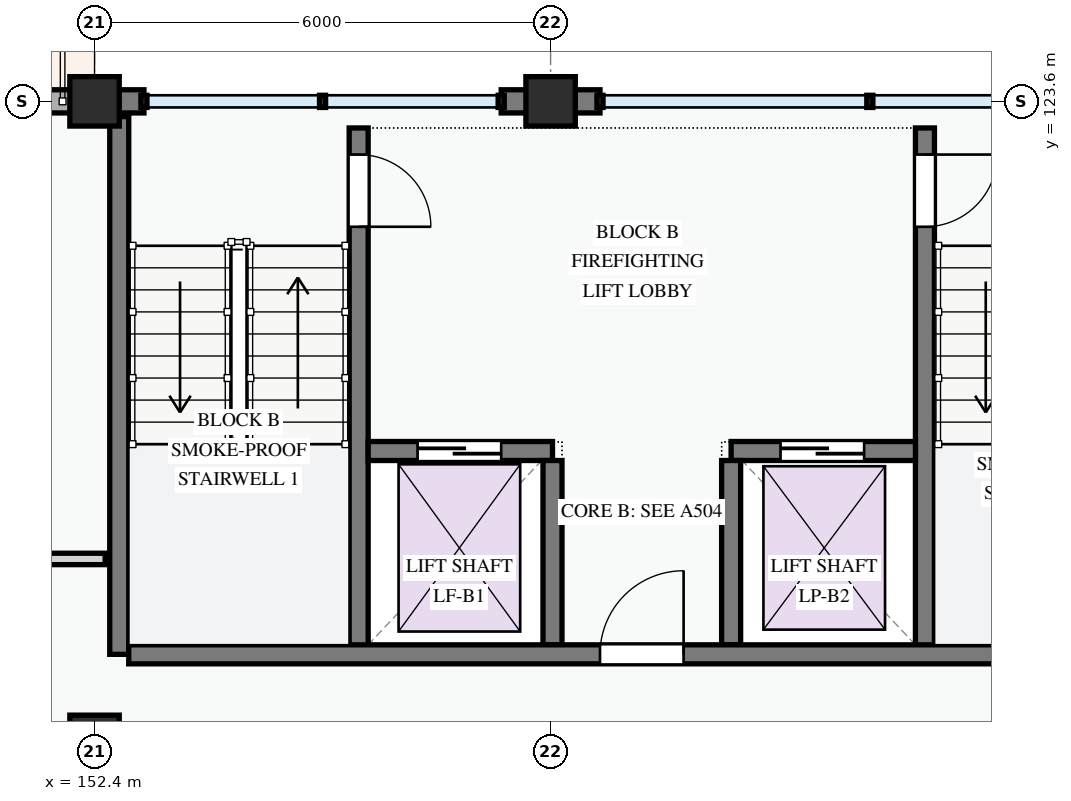
"""IFC4 building model, lengths in metres.
Left out: names, types, materials, properties, quantities, classifications, styles, units other than length and angle.
Written with IfcOpenShell. Run it as: python <this file> out.ifc"""

import sys

from ifc_helpers import new_model, si_unit, direction, frame, frame_2d, origin, origin_2d, place, context, subcontext, project, spatial, rectangle, extrude, element, fill, save


model = new_model("IFC4")
c1 = context("Model", 3, precision=1e-05, world=origin(), true_north=direction((0.0, 1.0)))
c2 = subcontext(c1, "Body", "Model", "MODEL_VIEW")
j1 = project(units=[si_unit("LENGTHUNIT", "METRE"), si_unit("PLANEANGLEUNIT", "RADIAN")], contexts=[c1])
p1 = place(None, origin())
s1 = spatial("IfcSite", under=j1, at=p1, CompositionType="ELEMENT")
p2 = place(p1, origin())
s2 = spatial("IfcBuilding", under=s1, at=p2, CompositionType="ELEMENT")
p3 = place(p2, frame((0.0, 0.0, 21.3)))
s3 = spatial("IfcBuildingStorey", under=s2, at=p3, CompositionType="ELEMENT", Elevation=21.3)
for number, where, z_axis, x_axis in (
    (1, (152.4, 115.2, 0.0), (0.0, 0.0, 1.0), (1.0, 0.0, 0.0)),
    (2, (152.4, 123.6, 0.0), (0.0, 0.0, 1.0), (1.0, 0.0, 0.0)),
    (3, (158.4, 123.6, 0.0), (0.0, 0.0, 1.0), (1.0, 0.0, 0.0)),
):
    element("IfcColumn", number, at=place(p3, frame(where, z_axis=z_axis, x_axis=x_axis)), inside=s3, PredefinedType="COLUMN", context=c2, shape_type="SweptSolid", body=[
        extrude(rectangle(XDim=0.65, YDim=0.65, at=origin_2d()), origin(), (0.0, 0.0, 1.0), 3.3),
    ])
p4 = place(p3, frame((159.05, 123.6, 0.0), z_axis=(0.0, 0.0, 1.0), x_axis=(-1.0, 0.0, 0.0)))
e4 = element("IfcWall", 4, at=p4, inside=s3, PredefinedType="STANDARD", context=c2, shape_type="SweptSolid", body=[
    extrude(rectangle(XDim=0.65, YDim=0.305, at=frame_2d((0.325, 0.0))), origin(), (0.0, 0.0, 1.0), 3.04),
])
p5 = place(p3, frame((158.4, 123.6, 0.0), z_axis=(0.0, 0.0, 1.0), x_axis=(-1.0, 0.0, 0.0)))
e5 = element("IfcWall", 5, at=p5, inside=s3, PredefinedType="STANDARD", context=c2, shape_type="SweptSolid", body=[
    extrude(rectangle(XDim=0.65, YDim=0.305, at=frame_2d((0.325, 0.0))), origin(), (0.0, 0.0, 1.0), 3.04),
])
p6 = place(p3, frame((153.05, 123.6, 0.0), z_axis=(0.0, 0.0, 1.0), x_axis=(-1.0, 0.0, 0.0)))
e6 = element("IfcWall", 6, at=p6, inside=s3, PredefinedType="STANDARD", context=c2, shape_type="SweptSolid", body=[
    extrude(rectangle(XDim=0.65, YDim=0.305, at=frame_2d((0.325, 0.0))), origin(), (0.0, 0.0, 1.0), 3.04),
])
p7 = place(p3, frame((152.4, 123.6, 0.0), z_axis=(0.0, 0.0, 1.0), x_axis=(-1.0, 0.0, 0.0)))
e7 = element("IfcWall", 7, at=p7, inside=s3, PredefinedType="STANDARD", context=c2, shape_type="SweptSolid", body=[
    extrude(rectangle(XDim=8.4, YDim=0.305, at=frame_2d((4.2, 0.0))), origin(), (0.0, 0.0, 1.0), 2.345),
])
p8 = place(p7, frame((0.62, 0.0, 0.0)))
e8 = element("IfcOpeningElement", 8, at=p8, cuts=e7, PredefinedType="OPENING", context=c2, shape_type="SweptSolid", body=[
    extrude(rectangle(XDim=1.1, YDim=2.15, at=frame_2d((0.55, 1.075))), frame((0.0, 0.163, 0.0), z_axis=(0.0, -1.0, 0.0), x_axis=(1.0, 0.0, 0.0)), (0.0, 0.0, 1.0), 0.325),
])
p9 = place(p7, frame((2.89, 0.0, 0.78)))
e9 = element("IfcOpeningElement", 9, at=p9, cuts=e7, PredefinedType="OPENING", context=c2, shape_type="SweptSolid", body=[
    extrude(rectangle(XDim=1.05, YDim=1.2, at=frame_2d((0.525, 0.6))), frame((0.0, 0.163, 0.0), z_axis=(0.0, -1.0, 0.0), x_axis=(1.0, 0.0, 0.0)), (0.0, 0.0, 1.0), 0.325),
])
p10 = place(p7, frame((5.755, 0.0, 0.78)))
e10 = element("IfcOpeningElement", 10, at=p10, cuts=e7, PredefinedType="OPENING", context=c2, shape_type="SweptSolid", body=[
    extrude(rectangle(XDim=1.62, YDim=1.38, at=frame_2d((0.81, 0.69))), frame((0.0, 0.163, 0.0), z_axis=(0.0, -1.0, 0.0), x_axis=(1.0, 0.0, 0.0)), (0.0, 0.0, 1.0), 0.325),
])
p11 = place(p3, frame((155.875, 123.25, 0.0), z_axis=(0.0, 0.0, 1.0), x_axis=(0.0, -1.0, 0.0)))
e11 = element("IfcWall", 11, at=p11, inside=s3, PredefinedType="SHEAR", context=c2, shape_type="SweptSolid", body=[
    extrude(rectangle(XDim=6.925, YDim=0.25, at=frame_2d((3.462, 0.0))), origin(), (0.0, 0.0, 1.0), 3.0),
])
p12 = place(p11, frame((0.35, 0.0, 0.0)))
e12 = element("IfcOpeningElement", 12, at=p12, cuts=e11, PredefinedType="OPENING", context=c2, shape_type="SweptSolid", body=[
    extrude(rectangle(XDim=0.95, YDim=2.1, at=frame_2d((0.475, 1.05))), frame((0.0, 0.135, 0.0), z_axis=(0.0, -1.0, 0.0), x_axis=(1.0, 0.0, 0.0)), (0.0, 0.0, 1.0), 0.27),
])
p13 = place(p3, frame((152.725, 123.4, 0.0), z_axis=(0.0, 0.0, 1.0), x_axis=(0.0, -1.0, 0.0)))
e13 = element("IfcWall", 13, at=p13, inside=s3, PredefinedType="SHEAR", context=c2, shape_type="SweptSolid", body=[
    extrude(rectangle(XDim=7.075, YDim=0.25, at=frame_2d((3.538, 0.0))), origin(), (0.0, 0.0, 1.0), 3.0),
])
p14 = place(p3, frame((163.325, 123.25, 0.0), z_axis=(0.0, 0.0, 1.0), x_axis=(0.0, -1.0, 0.0)))
e14 = element("IfcWall", 14, at=p14, inside=s3, PredefinedType="SHEAR", context=c2, shape_type="SweptSolid", body=[
    extrude(rectangle(XDim=6.925, YDim=0.25, at=frame_2d((3.462, 0.0))), origin(), (0.0, 0.0, 1.0), 3.0),
])
p15 = place(p14, frame((0.35, 0.0, 0.0)))
e15 = element("IfcOpeningElement", 15, at=p15, cuts=e14, PredefinedType="OPENING", context=c2, shape_type="SweptSolid", body=[
    extrude(rectangle(XDim=0.95, YDim=2.1, at=frame_2d((0.475, 1.05))), frame((0.0, 0.135, 0.0), z_axis=(0.0, -1.0, 0.0), x_axis=(1.0, 0.0, 0.0)), (0.0, 0.0, 1.0), 0.27),
])
p16 = place(p3, frame((156.0, 119.0, 0.0), z_axis=(0.0, 0.0, 1.0), x_axis=(1.0, 0.0, 0.0)))
e16 = element("IfcWall", 16, at=p16, inside=s3, PredefinedType="SHEAR", context=c2, shape_type="SweptSolid", body=[
    extrude(rectangle(XDim=2.425, YDim=0.25, at=frame_2d((1.212, 0.0))), origin(), (0.0, 0.0, 1.0), 3.0),
])
p17 = place(p16, frame((0.65, 0.0, 0.0)))
e17 = element("IfcOpeningElement", 17, at=p17, cuts=e16, PredefinedType="OPENING", context=c2, shape_type="SweptSolid", body=[
    extrude(rectangle(XDim=1.1, YDim=2.15, at=frame_2d((0.55, 1.075))), frame((0.0, 0.135, 0.0), z_axis=(0.0, -1.0, 0.0), x_axis=(1.0, 0.0, 0.0)), (0.0, 0.0, 1.0), 0.27),
])
p18 = place(p3, frame((160.775, 119.0, 0.0), z_axis=(0.0, 0.0, 1.0), x_axis=(1.0, 0.0, 0.0)))
e18 = element("IfcWall", 18, at=p18, inside=s3, PredefinedType="SHEAR", context=c2, shape_type="SweptSolid", body=[
    extrude(rectangle(XDim=2.425, YDim=0.25, at=frame_2d((1.212, 0.0))), origin(), (0.0, 0.0, 1.0), 3.0),
])
p19 = place(p18, frame((0.65, 0.0, 0.0)))
e19 = element("IfcOpeningElement", 19, at=p19, cuts=e18, PredefinedType="OPENING", context=c2, shape_type="SweptSolid", body=[
    extrude(rectangle(XDim=1.1, YDim=2.15, at=frame_2d((0.55, 1.075))), frame((0.0, 0.135, 0.0), z_axis=(0.0, -1.0, 0.0), x_axis=(1.0, 0.0, 0.0)), (0.0, 0.0, 1.0), 0.27),
])
for number, where, z_axis, x_axis in (
    (20, (158.425, 118.875, 0.0), (0.0, 0.0, 1.0), (0.0, -1.0, 0.0)),
    (21, (160.775, 118.875, 0.0), (0.0, 0.0, 1.0), (0.0, -1.0, 0.0)),
):
    element("IfcWall", number, at=place(p3, frame(where, z_axis=z_axis, x_axis=x_axis)), inside=s3, PredefinedType="SHEAR", context=c2, shape_type="SweptSolid", body=[
        extrude(rectangle(XDim=2.425, YDim=0.25, at=frame_2d((1.212, 0.0))), origin(), (0.0, 0.0, 1.0), 3.0),
    ])
p20 = place(p3, frame((152.85, 116.325, 0.0), z_axis=(0.0, 0.0, 1.0), x_axis=(1.0, 0.0, 0.0)))
e22 = element("IfcWall", 22, at=p20, inside=s3, PredefinedType="SHEAR", context=c2, shape_type="SweptSolid", body=[
    extrude(rectangle(XDim=13.5, YDim=0.25, at=frame_2d((6.75, 0.0))), origin(), (0.0, 0.0, 1.0), 3.0),
])
p21 = place(p20, frame((6.2, 0.0, 0.0)))
e23 = element("IfcOpeningElement", 23, at=p21, cuts=e22, PredefinedType="OPENING", context=c2, shape_type="SweptSolid", body=[
    extrude(rectangle(XDim=1.1, YDim=2.15, at=frame_2d((0.55, 1.075))), frame((0.0, 0.135, 0.0), z_axis=(0.0, -1.0, 0.0), x_axis=(1.0, 0.0, 0.0)), (0.0, 0.0, 1.0), 0.27),
])
p22 = place(p3, frame((80.554, 117.58, 0.0), z_axis=(0.0, 0.0, 1.0), x_axis=(1.0, 0.0, 0.0)))
e24 = element("IfcWall", 24, at=p22, inside=s3, PredefinedType="PARTITIONING", context=c2, shape_type="SweptSolid", body=[
    extrude(rectangle(XDim=71.986, YDim=0.15, at=frame_2d((35.993, 0.0))), origin(), (0.0, 0.0, 1.0), 3.0),
])
p23 = place(p22, frame((2.254, 0.0, 0.0)))
e25 = element("IfcOpeningElement", 25, at=p23, cuts=e24, PredefinedType="OPENING", context=c2, shape_type="SweptSolid", body=[
    extrude(rectangle(XDim=0.92, YDim=2.1, at=frame_2d((0.46, 1.05))), frame((0.0, 0.085, 0.0), z_axis=(0.0, -1.0, 0.0), x_axis=(1.0, 0.0, 0.0)), (0.0, 0.0, 1.0), 0.17),
])
p24 = place(p22, frame((23.937, 0.0, 0.0)))
e26 = element("IfcOpeningElement", 26, at=p24, cuts=e24, PredefinedType="OPENING", context=c2, shape_type="SweptSolid", body=[
    extrude(rectangle(XDim=0.96, YDim=2.12, at=frame_2d((0.48, 1.06))), frame((0.0, 0.085, 0.0), z_axis=(0.0, -1.0, 0.0), x_axis=(1.0, 0.0, 0.0)), (0.0, 0.0, 1.0), 0.17),
])
p25 = place(p22, frame((39.125, 0.0, 0.0)))
e27 = element("IfcOpeningElement", 27, at=p25, cuts=e24, PredefinedType="OPENING", context=c2, shape_type="SweptSolid", body=[
    extrude(rectangle(XDim=0.92, YDim=2.1, at=frame_2d((0.46, 1.05))), frame((0.0, 0.085, 0.0), z_axis=(0.0, -1.0, 0.0), x_axis=(1.0, 0.0, 0.0)), (0.0, 0.0, 1.0), 0.17),
])
p26 = place(p22, frame((59.922, 0.0, 0.0)))
e28 = element("IfcOpeningElement", 28, at=p26, cuts=e24, PredefinedType="OPENING", context=c2, shape_type="SweptSolid", body=[
    extrude(rectangle(XDim=0.92, YDim=2.1, at=frame_2d((0.46, 1.05))), frame((0.0, 0.085, 0.0), z_axis=(0.0, -1.0, 0.0), x_axis=(1.0, 0.0, 0.0)), (0.0, 0.0, 1.0), 0.17),
])
p27 = place(p12, origin())
e29 = element("IfcDoor", 29, at=p27, inside=s3, OperationType="SINGLE_SWING_RIGHT", PredefinedType="DOOR", context=c2, shape_type="SweptSolid", body=[
    extrude(rectangle(XDim=0.95, YDim=2.1, at=frame_2d((0.475, 1.05))), frame((0.0, 0.025, 0.0), z_axis=(0.0, -1.0, 0.0), x_axis=(1.0, 0.0, 0.0)), (0.0, 0.0, 1.0), 0.05),
])
fill(e12, e29)
p28 = place(p15, origin())
e30 = element("IfcDoor", 30, at=p28, inside=s3, OperationType="SINGLE_SWING_LEFT", PredefinedType="DOOR", context=c2, shape_type="SweptSolid", body=[
    extrude(rectangle(XDim=0.95, YDim=2.1, at=frame_2d((0.475, 1.05))), frame((0.0, 0.025, 0.0), z_axis=(0.0, -1.0, 0.0), x_axis=(1.0, 0.0, 0.0)), (0.0, 0.0, 1.0), 0.05),
])
fill(e15, e30)
p29 = place(p17, origin())
e31 = element("IfcDoor", 31, at=p29, inside=s3, OperationType="SLIDING_TO_LEFT", PredefinedType="DOOR", context=c2, shape_type="SweptSolid", body=[
    extrude(rectangle(XDim=1.1, YDim=2.15, at=frame_2d((0.55, 1.075))), frame((0.0, 0.025, 0.0), z_axis=(0.0, -1.0, 0.0), x_axis=(1.0, 0.0, 0.0)), (0.0, 0.0, 1.0), 0.05),
])
fill(e17, e31)
p30 = place(p19, origin())
e32 = element("IfcDoor", 32, at=p30, inside=s3, OperationType="SLIDING_TO_LEFT", PredefinedType="DOOR", context=c2, shape_type="SweptSolid", body=[
    extrude(rectangle(XDim=1.1, YDim=2.15, at=frame_2d((0.55, 1.075))), frame((0.0, 0.025, 0.0), z_axis=(0.0, -1.0, 0.0), x_axis=(1.0, 0.0, 0.0)), (0.0, 0.0, 1.0), 0.05),
])
fill(e19, e32)
p31 = place(p21, origin())
e33 = element("IfcDoor", 33, at=p31, inside=s3, OperationType="SINGLE_SWING_RIGHT", PredefinedType="DOOR", context=c2, shape_type="SweptSolid", body=[
    extrude(rectangle(XDim=1.1, YDim=2.15, at=frame_2d((0.55, 1.075))), frame((0.0, 0.025, 0.0), z_axis=(0.0, -1.0, 0.0), x_axis=(1.0, 0.0, 0.0)), (0.0, 0.0, 1.0), 0.05),
])
fill(e23, e33)
save(model, sys.argv[1])
